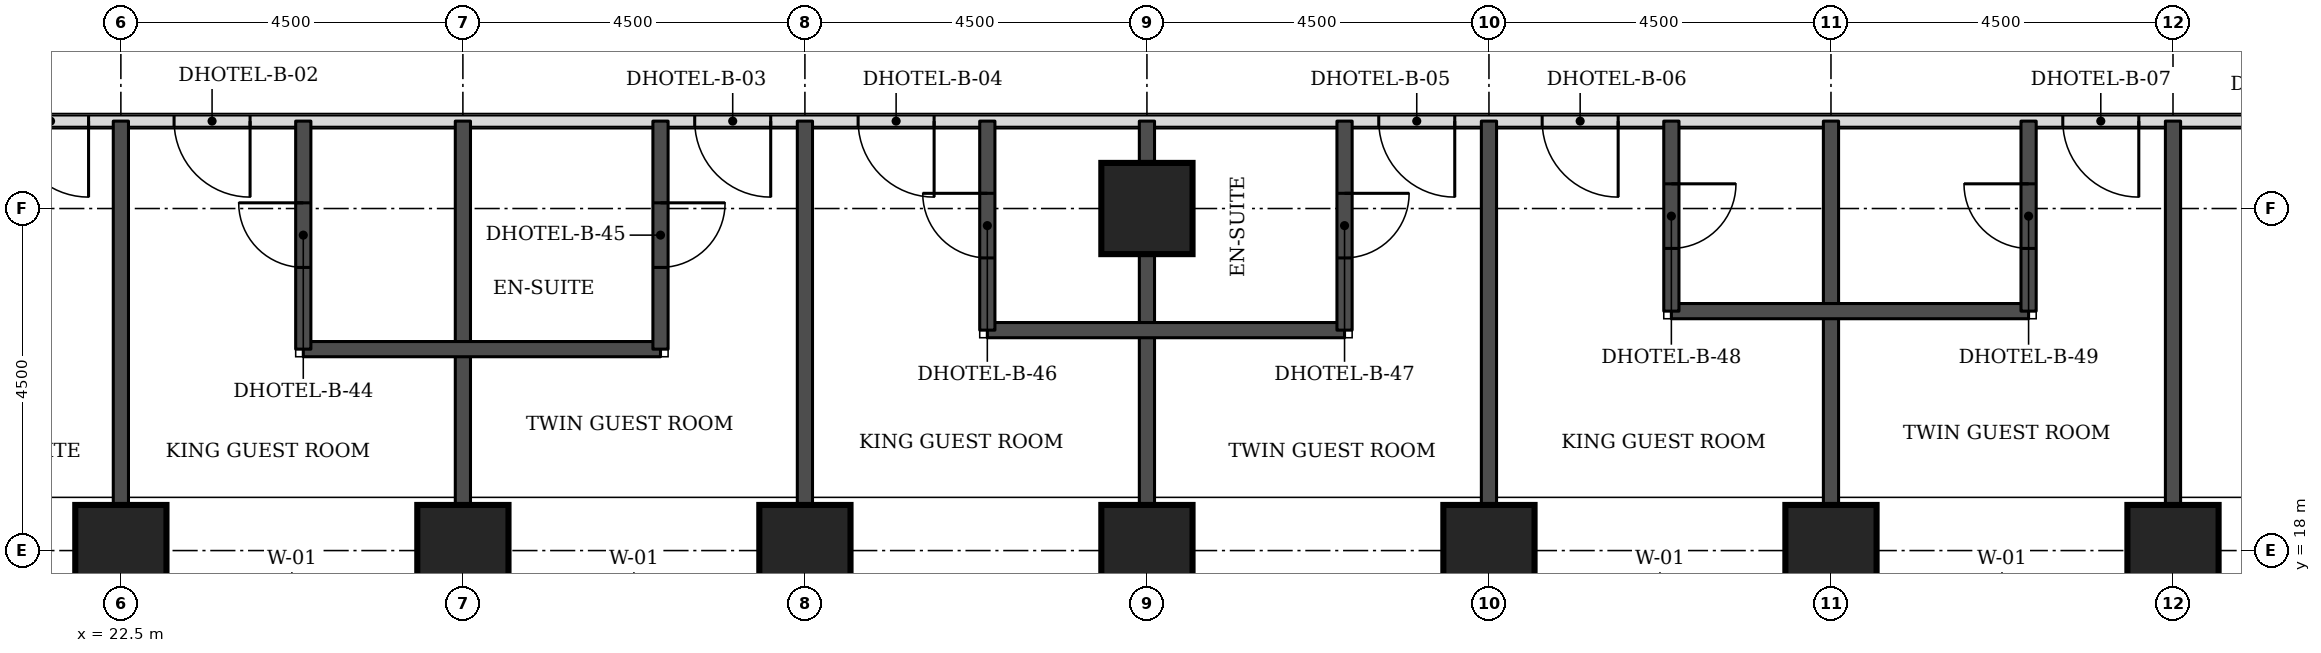
"""IFC4 building model, lengths in metres.
Left out: names, types, materials, properties, quantities, classifications, styles, units other than length and angle.
Written with IfcOpenShell. Run it as: python <this file> out.ifc"""

import sys

from ifc_helpers import new_model, si_unit, direction, frame, frame_2d, origin, origin_2d, place, context, subcontext, project, spatial, rectangle, extrude, element, fill, save


model = new_model("IFC4")
c1 = context("Model", 3, precision=1e-05, world=origin(), true_north=direction((0.0, 1.0)))
c2 = subcontext(c1, "Body", "Model", "MODEL_VIEW")
j1 = project(units=[si_unit("LENGTHUNIT", "METRE"), si_unit("PLANEANGLEUNIT", "RADIAN")], contexts=[c1])
p1 = place(None, origin())
s1 = spatial("IfcSite", under=j1, at=p1, CompositionType="ELEMENT")
p2 = place(p1, origin())
s2 = spatial("IfcBuilding", under=s1, at=p2, CompositionType="ELEMENT")
p3 = place(p2, frame((0.0, 0.0, 52.8)))
s3 = spatial("IfcBuildingStorey", under=s2, at=p3, CompositionType="ELEMENT", Elevation=52.8)
for number, where, z_axis, x_axis in (
    (1, (22.5, 18.0, 0.0), (0.0, 0.0, 1.0), (1.0, 0.0, 0.0)),
    (2, (27.0, 18.0, 0.0), (0.0, 0.0, 1.0), (1.0, 0.0, 0.0)),
    (3, (31.5, 18.0, 0.0), (0.0, 0.0, 1.0), (1.0, 0.0, 0.0)),
    (4, (36.0, 18.0, 0.0), (0.0, 0.0, 1.0), (1.0, 0.0, 0.0)),
    (5, (40.5, 18.0, 0.0), (0.0, 0.0, 1.0), (1.0, 0.0, 0.0)),
    (6, (45.0, 18.0, 0.0), (0.0, 0.0, 1.0), (1.0, 0.0, 0.0)),
    (7, (49.5, 18.0, 0.0), (0.0, 0.0, 1.0), (1.0, 0.0, 0.0)),
    (8, (36.0, 22.5, 0.0), (0.0, 0.0, 1.0), (1.0, 0.0, 0.0)),
):
    element("IfcColumn", number, at=place(p3, frame(where, z_axis=z_axis, x_axis=x_axis)), inside=s3, PredefinedType="COLUMN", context=c2, shape_type="SweptSolid", body=[
        extrude(rectangle(XDim=1.2, YDim=1.2, at=origin_2d()), origin(), (0.0, 0.0, 1.0), 3.3),
    ])
p4 = place(p3, frame((20.65, 23.65, 0.0), z_axis=(0.0, 0.0, 1.0), x_axis=(1.0, 0.0, 0.0)))
e9 = element("IfcWall", 9, at=p4, inside=s3, PredefinedType="PARTITIONING", context=c2, shape_type="SweptSolid", body=[
    extrude(rectangle(XDim=32.2, YDim=0.15, at=frame_2d((16.1, 0.0))), origin(), (0.0, 0.0, 1.0), 3.08),
])
p5 = place(p4, frame((2.55, 0.0, 0.0)))
e10 = element("IfcOpeningElement", 10, at=p5, cuts=e9, PredefinedType="OPENING", context=c2, shape_type="SweptSolid", body=[
    extrude(rectangle(XDim=1.0, YDim=2.1, at=frame_2d((0.5, 1.05))), frame((0.0, 0.085, 0.0), z_axis=(0.0, -1.0, 0.0), x_axis=(1.0, 0.0, 0.0)), (0.0, 0.0, 1.0), 0.17),
])
p6 = place(p4, frame((9.4, 0.0, 0.0)))
e11 = element("IfcOpeningElement", 11, at=p6, cuts=e9, PredefinedType="OPENING", context=c2, shape_type="SweptSolid", body=[
    extrude(rectangle(XDim=1.0, YDim=2.1, at=frame_2d((0.5, 1.05))), frame((0.0, 0.085, 0.0), z_axis=(0.0, -1.0, 0.0), x_axis=(1.0, 0.0, 0.0)), (0.0, 0.0, 1.0), 0.17),
])
p7 = place(p4, frame((11.55, 0.0, 0.0)))
e12 = element("IfcOpeningElement", 12, at=p7, cuts=e9, PredefinedType="OPENING", context=c2, shape_type="SweptSolid", body=[
    extrude(rectangle(XDim=1.0, YDim=2.1, at=frame_2d((0.5, 1.05))), frame((0.0, 0.085, 0.0), z_axis=(0.0, -1.0, 0.0), x_axis=(1.0, 0.0, 0.0)), (0.0, 0.0, 1.0), 0.17),
])
p8 = place(p4, frame((18.4, 0.0, 0.0)))
e13 = element("IfcOpeningElement", 13, at=p8, cuts=e9, PredefinedType="OPENING", context=c2, shape_type="SweptSolid", body=[
    extrude(rectangle(XDim=1.0, YDim=2.1, at=frame_2d((0.5, 1.05))), frame((0.0, 0.085, 0.0), z_axis=(0.0, -1.0, 0.0), x_axis=(1.0, 0.0, 0.0)), (0.0, 0.0, 1.0), 0.17),
])
p9 = place(p4, frame((20.55, 0.0, 0.0)))
e14 = element("IfcOpeningElement", 14, at=p9, cuts=e9, PredefinedType="OPENING", context=c2, shape_type="SweptSolid", body=[
    extrude(rectangle(XDim=1.0, YDim=2.1, at=frame_2d((0.5, 1.05))), frame((0.0, 0.085, 0.0), z_axis=(0.0, -1.0, 0.0), x_axis=(1.0, 0.0, 0.0)), (0.0, 0.0, 1.0), 0.17),
])
p10 = place(p4, frame((27.4, 0.0, 0.0)))
e15 = element("IfcOpeningElement", 15, at=p10, cuts=e9, PredefinedType="OPENING", context=c2, shape_type="SweptSolid", body=[
    extrude(rectangle(XDim=1.0, YDim=2.1, at=frame_2d((0.5, 1.05))), frame((0.0, 0.085, 0.0), z_axis=(0.0, -1.0, 0.0), x_axis=(1.0, 0.0, 0.0)), (0.0, 0.0, 1.0), 0.17),
])
p11 = place(p4, frame((0.425, 0.0, 0.0)))
e16 = element("IfcOpeningElement", 16, at=p11, cuts=e9, PredefinedType="OPENING", context=c2, shape_type="SweptSolid", body=[
    extrude(rectangle(XDim=1.0, YDim=2.1, at=frame_2d((0.5, 1.05))), frame((0.0, 0.085, 0.0), z_axis=(0.0, -1.0, 0.0), x_axis=(1.0, 0.0, 0.0)), (0.0, 0.0, 1.0), 0.17),
])
p12 = place(p4, frame((30.025, 0.0, 0.0)))
e17 = element("IfcOpeningElement", 17, at=p12, cuts=e9, PredefinedType="OPENING", context=c2, shape_type="SweptSolid", body=[
    extrude(rectangle(XDim=1.0, YDim=2.1, at=frame_2d((0.5, 1.05))), frame((0.0, 0.085, 0.0), z_axis=(0.0, -1.0, 0.0), x_axis=(1.0, 0.0, 0.0)), (0.0, 0.0, 1.0), 0.17),
])
for number, where, z_axis, x_axis in (
    (18, (22.5, 18.6, 0.0), (0.0, 0.0, 1.0), (0.0, 1.0, 0.0)),
    (19, (27.0, 18.6, 0.0), (0.0, 0.0, 1.0), (0.0, 1.0, 0.0)),
    (20, (31.5, 18.6, 0.0), (0.0, 0.0, 1.0), (0.0, 1.0, 0.0)),
    (21, (36.0, 18.6, 0.0), (0.0, 0.0, 1.0), (0.0, 1.0, 0.0)),
    (22, (40.5, 18.6, 0.0), (0.0, 0.0, 1.0), (0.0, 1.0, 0.0)),
    (23, (45.0, 18.6, 0.0), (0.0, 0.0, 1.0), (0.0, 1.0, 0.0)),
    (24, (49.5, 18.6, 0.0), (0.0, 0.0, 1.0), (0.0, 1.0, 0.0)),
):
    element("IfcWall", number, at=place(p3, frame(where, z_axis=z_axis, x_axis=x_axis)), inside=s3, PredefinedType="SOLIDWALL", context=c2, shape_type="SweptSolid", body=[
        extrude(rectangle(XDim=5.05, YDim=0.2, at=frame_2d((2.525, 0.0))), origin(), (0.0, 0.0, 1.0), 3.08),
    ])
p13 = place(p3, frame((24.9, 20.65, 0.0), z_axis=(0.0, 0.0, 1.0), x_axis=(1.0, 0.0, 0.0)))
e25 = element("IfcWall", 25, at=p13, inside=s3, PredefinedType="SOLIDWALL", context=c2, shape_type="SweptSolid", body=[
    extrude(rectangle(XDim=4.7, YDim=0.2, at=frame_2d((2.35, 0.0))), origin(), (0.0, 0.0, 1.0), 3.08),
])
p14 = place(p3, frame((24.9, 20.65, 0.0), z_axis=(0.0, 0.0, 1.0), x_axis=(0.0, 1.0, 0.0)))
e26 = element("IfcWall", 26, at=p14, inside=s3, PredefinedType="SOLIDWALL", context=c2, shape_type="SweptSolid", body=[
    extrude(rectangle(XDim=3.0, YDim=0.2, at=frame_2d((1.5, 0.0))), origin(), (0.0, 0.0, 1.0), 3.08),
])
p15 = place(p14, frame((1.075, 0.0, 0.0)))
e27 = element("IfcOpeningElement", 27, at=p15, cuts=e26, PredefinedType="OPENING", context=c2, shape_type="SweptSolid", body=[
    extrude(rectangle(XDim=0.85, YDim=2.1, at=frame_2d((0.425, 1.05))), frame((0.0, 0.11, 0.0), z_axis=(0.0, -1.0, 0.0), x_axis=(1.0, 0.0, 0.0)), (0.0, 0.0, 1.0), 0.22),
])
p16 = place(p3, frame((29.6, 20.65, 0.0), z_axis=(0.0, 0.0, 1.0), x_axis=(0.0, 1.0, 0.0)))
e28 = element("IfcWall", 28, at=p16, inside=s3, PredefinedType="SOLIDWALL", context=c2, shape_type="SweptSolid", body=[
    extrude(rectangle(XDim=3.0, YDim=0.2, at=frame_2d((1.5, 0.0))), origin(), (0.0, 0.0, 1.0), 3.08),
])
p17 = place(p16, frame((1.075, 0.0, 0.0)))
e29 = element("IfcOpeningElement", 29, at=p17, cuts=e28, PredefinedType="OPENING", context=c2, shape_type="SweptSolid", body=[
    extrude(rectangle(XDim=0.85, YDim=2.1, at=frame_2d((0.425, 1.05))), frame((0.0, 0.11, 0.0), z_axis=(0.0, -1.0, 0.0), x_axis=(1.0, 0.0, 0.0)), (0.0, 0.0, 1.0), 0.22),
])
p18 = place(p3, frame((33.9, 20.9, 0.0), z_axis=(0.0, 0.0, 1.0), x_axis=(1.0, 0.0, 0.0)))
e30 = element("IfcWall", 30, at=p18, inside=s3, PredefinedType="SOLIDWALL", context=c2, shape_type="SweptSolid", body=[
    extrude(rectangle(XDim=4.7, YDim=0.2, at=frame_2d((2.35, 0.0))), origin(), (0.0, 0.0, 1.0), 3.08),
])
p19 = place(p3, frame((33.9, 20.9, 0.0), z_axis=(0.0, 0.0, 1.0), x_axis=(0.0, 1.0, 0.0)))
e31 = element("IfcWall", 31, at=p19, inside=s3, PredefinedType="SOLIDWALL", context=c2, shape_type="SweptSolid", body=[
    extrude(rectangle(XDim=2.75, YDim=0.2, at=frame_2d((1.375, 0.0))), origin(), (0.0, 0.0, 1.0), 3.08),
])
p20 = place(p19, frame((0.95, 0.0, 0.0)))
e32 = element("IfcOpeningElement", 32, at=p20, cuts=e31, PredefinedType="OPENING", context=c2, shape_type="SweptSolid", body=[
    extrude(rectangle(XDim=0.85, YDim=2.1, at=frame_2d((0.425, 1.05))), frame((0.0, 0.11, 0.0), z_axis=(0.0, -1.0, 0.0), x_axis=(1.0, 0.0, 0.0)), (0.0, 0.0, 1.0), 0.22),
])
p21 = place(p3, frame((38.6, 20.9, 0.0), z_axis=(0.0, 0.0, 1.0), x_axis=(0.0, 1.0, 0.0)))
e33 = element("IfcWall", 33, at=p21, inside=s3, PredefinedType="SOLIDWALL", context=c2, shape_type="SweptSolid", body=[
    extrude(rectangle(XDim=2.75, YDim=0.2, at=frame_2d((1.375, 0.0))), origin(), (0.0, 0.0, 1.0), 3.08),
])
p22 = place(p21, frame((0.95, 0.0, 0.0)))
e34 = element("IfcOpeningElement", 34, at=p22, cuts=e33, PredefinedType="OPENING", context=c2, shape_type="SweptSolid", body=[
    extrude(rectangle(XDim=0.85, YDim=2.1, at=frame_2d((0.425, 1.05))), frame((0.0, 0.11, 0.0), z_axis=(0.0, -1.0, 0.0), x_axis=(1.0, 0.0, 0.0)), (0.0, 0.0, 1.0), 0.22),
])
p23 = place(p3, frame((42.9, 21.15, 0.0), z_axis=(0.0, 0.0, 1.0), x_axis=(1.0, 0.0, 0.0)))
e35 = element("IfcWall", 35, at=p23, inside=s3, PredefinedType="SOLIDWALL", context=c2, shape_type="SweptSolid", body=[
    extrude(rectangle(XDim=4.7, YDim=0.2, at=frame_2d((2.35, 0.0))), origin(), (0.0, 0.0, 1.0), 3.08),
])
p24 = place(p3, frame((42.9, 21.15, 0.0), z_axis=(0.0, 0.0, 1.0), x_axis=(0.0, 1.0, 0.0)))
e36 = element("IfcWall", 36, at=p24, inside=s3, PredefinedType="SOLIDWALL", context=c2, shape_type="SweptSolid", body=[
    extrude(rectangle(XDim=2.5, YDim=0.2, at=frame_2d((1.25, 0.0))), origin(), (0.0, 0.0, 1.0), 3.08),
])
p25 = place(p24, frame((0.825, 0.0, 0.0)))
e37 = element("IfcOpeningElement", 37, at=p25, cuts=e36, PredefinedType="OPENING", context=c2, shape_type="SweptSolid", body=[
    extrude(rectangle(XDim=0.85, YDim=2.1, at=frame_2d((0.425, 1.05))), frame((0.0, 0.11, 0.0), z_axis=(0.0, -1.0, 0.0), x_axis=(1.0, 0.0, 0.0)), (0.0, 0.0, 1.0), 0.22),
])
p26 = place(p3, frame((47.6, 21.15, 0.0), z_axis=(0.0, 0.0, 1.0), x_axis=(0.0, 1.0, 0.0)))
e38 = element("IfcWall", 38, at=p26, inside=s3, PredefinedType="SOLIDWALL", context=c2, shape_type="SweptSolid", body=[
    extrude(rectangle(XDim=2.5, YDim=0.2, at=frame_2d((1.25, 0.0))), origin(), (0.0, 0.0, 1.0), 3.08),
])
p27 = place(p26, frame((0.825, 0.0, 0.0)))
e39 = element("IfcOpeningElement", 39, at=p27, cuts=e38, PredefinedType="OPENING", context=c2, shape_type="SweptSolid", body=[
    extrude(rectangle(XDim=0.85, YDim=2.1, at=frame_2d((0.425, 1.05))), frame((0.0, 0.11, 0.0), z_axis=(0.0, -1.0, 0.0), x_axis=(1.0, 0.0, 0.0)), (0.0, 0.0, 1.0), 0.22),
])
p28 = place(p5, frame((1.0, 0.0, 0.0), z_axis=(0.0, 0.0, 1.0), x_axis=(-1.0, 0.0, 0.0)))
e40 = element("IfcDoor", 40, at=p28, inside=s3, OperationType="SINGLE_SWING_LEFT", PredefinedType="DOOR", context=c2, shape_type="SweptSolid", body=[
    extrude(rectangle(XDim=1.0, YDim=2.1, at=frame_2d((0.5, 1.05))), frame((0.0, 0.025, 0.0), z_axis=(0.0, -1.0, 0.0), x_axis=(1.0, 0.0, 0.0)), (0.0, 0.0, 1.0), 0.05),
])
fill(e10, e40)
p29 = place(p15, origin())
e41 = element("IfcDoor", 41, at=p29, inside=s3, OperationType="SINGLE_SWING_RIGHT", PredefinedType="DOOR", context=c2, shape_type="SweptSolid", body=[
    extrude(rectangle(XDim=0.85, YDim=2.1, at=frame_2d((0.425, 1.05))), frame((0.0, 0.025, 0.0), z_axis=(0.0, -1.0, 0.0), x_axis=(1.0, 0.0, 0.0)), (0.0, 0.0, 1.0), 0.05),
])
fill(e27, e41)
p30 = place(p6, frame((1.0, 0.0, 0.0), z_axis=(0.0, 0.0, 1.0), x_axis=(-1.0, 0.0, 0.0)))
e42 = element("IfcDoor", 42, at=p30, inside=s3, OperationType="SINGLE_SWING_LEFT", PredefinedType="DOOR", context=c2, shape_type="SweptSolid", body=[
    extrude(rectangle(XDim=1.0, YDim=2.1, at=frame_2d((0.5, 1.05))), frame((0.0, 0.025, 0.0), z_axis=(0.0, -1.0, 0.0), x_axis=(1.0, 0.0, 0.0)), (0.0, 0.0, 1.0), 0.05),
])
fill(e11, e42)
p31 = place(p17, frame((0.85, 0.0, 0.0), z_axis=(0.0, 0.0, 1.0), x_axis=(-1.0, 0.0, 0.0)))
e43 = element("IfcDoor", 43, at=p31, inside=s3, OperationType="SINGLE_SWING_LEFT", PredefinedType="DOOR", context=c2, shape_type="SweptSolid", body=[
    extrude(rectangle(XDim=0.85, YDim=2.1, at=frame_2d((0.425, 1.05))), frame((0.0, 0.025, 0.0), z_axis=(0.0, -1.0, 0.0), x_axis=(1.0, 0.0, 0.0)), (0.0, 0.0, 1.0), 0.05),
])
fill(e29, e43)
p32 = place(p7, frame((1.0, 0.0, 0.0), z_axis=(0.0, 0.0, 1.0), x_axis=(-1.0, 0.0, 0.0)))
e44 = element("IfcDoor", 44, at=p32, inside=s3, OperationType="SINGLE_SWING_LEFT", PredefinedType="DOOR", context=c2, shape_type="SweptSolid", body=[
    extrude(rectangle(XDim=1.0, YDim=2.1, at=frame_2d((0.5, 1.05))), frame((0.0, 0.025, 0.0), z_axis=(0.0, -1.0, 0.0), x_axis=(1.0, 0.0, 0.0)), (0.0, 0.0, 1.0), 0.05),
])
fill(e12, e44)
p33 = place(p20, origin())
e45 = element("IfcDoor", 45, at=p33, inside=s3, OperationType="SINGLE_SWING_RIGHT", PredefinedType="DOOR", context=c2, shape_type="SweptSolid", body=[
    extrude(rectangle(XDim=0.85, YDim=2.1, at=frame_2d((0.425, 1.05))), frame((0.0, 0.025, 0.0), z_axis=(0.0, -1.0, 0.0), x_axis=(1.0, 0.0, 0.0)), (0.0, 0.0, 1.0), 0.05),
])
fill(e32, e45)
p34 = place(p8, frame((1.0, 0.0, 0.0), z_axis=(0.0, 0.0, 1.0), x_axis=(-1.0, 0.0, 0.0)))
e46 = element("IfcDoor", 46, at=p34, inside=s3, OperationType="SINGLE_SWING_LEFT", PredefinedType="DOOR", context=c2, shape_type="SweptSolid", body=[
    extrude(rectangle(XDim=1.0, YDim=2.1, at=frame_2d((0.5, 1.05))), frame((0.0, 0.025, 0.0), z_axis=(0.0, -1.0, 0.0), x_axis=(1.0, 0.0, 0.0)), (0.0, 0.0, 1.0), 0.05),
])
fill(e13, e46)
p35 = place(p22, frame((0.85, 0.0, 0.0), z_axis=(0.0, 0.0, 1.0), x_axis=(-1.0, 0.0, 0.0)))
e47 = element("IfcDoor", 47, at=p35, inside=s3, OperationType="SINGLE_SWING_LEFT", PredefinedType="DOOR", context=c2, shape_type="SweptSolid", body=[
    extrude(rectangle(XDim=0.85, YDim=2.1, at=frame_2d((0.425, 1.05))), frame((0.0, 0.025, 0.0), z_axis=(0.0, -1.0, 0.0), x_axis=(1.0, 0.0, 0.0)), (0.0, 0.0, 1.0), 0.05),
])
fill(e34, e47)
p36 = place(p9, frame((1.0, 0.0, 0.0), z_axis=(0.0, 0.0, 1.0), x_axis=(-1.0, 0.0, 0.0)))
e48 = element("IfcDoor", 48, at=p36, inside=s3, OperationType="SINGLE_SWING_LEFT", PredefinedType="DOOR", context=c2, shape_type="SweptSolid", body=[
    extrude(rectangle(XDim=1.0, YDim=2.1, at=frame_2d((0.5, 1.05))), frame((0.0, 0.025, 0.0), z_axis=(0.0, -1.0, 0.0), x_axis=(1.0, 0.0, 0.0)), (0.0, 0.0, 1.0), 0.05),
])
fill(e14, e48)
p37 = place(p25, frame((0.85, 0.0, 0.0), z_axis=(0.0, 0.0, 1.0), x_axis=(-1.0, 0.0, 0.0)))
e49 = element("IfcDoor", 49, at=p37, inside=s3, OperationType="SINGLE_SWING_LEFT", PredefinedType="DOOR", context=c2, shape_type="SweptSolid", body=[
    extrude(rectangle(XDim=0.85, YDim=2.1, at=frame_2d((0.425, 1.05))), frame((0.0, 0.025, 0.0), z_axis=(0.0, -1.0, 0.0), x_axis=(1.0, 0.0, 0.0)), (0.0, 0.0, 1.0), 0.05),
])
fill(e37, e49)
p38 = place(p10, frame((1.0, 0.0, 0.0), z_axis=(0.0, 0.0, 1.0), x_axis=(-1.0, 0.0, 0.0)))
e50 = element("IfcDoor", 50, at=p38, inside=s3, OperationType="SINGLE_SWING_LEFT", PredefinedType="DOOR", context=c2, shape_type="SweptSolid", body=[
    extrude(rectangle(XDim=1.0, YDim=2.1, at=frame_2d((0.5, 1.05))), frame((0.0, 0.025, 0.0), z_axis=(0.0, -1.0, 0.0), x_axis=(1.0, 0.0, 0.0)), (0.0, 0.0, 1.0), 0.05),
])
fill(e15, e50)
p39 = place(p27, origin())
e51 = element("IfcDoor", 51, at=p39, inside=s3, OperationType="SINGLE_SWING_RIGHT", PredefinedType="DOOR", context=c2, shape_type="SweptSolid", body=[
    extrude(rectangle(XDim=0.85, YDim=2.1, at=frame_2d((0.425, 1.05))), frame((0.0, 0.025, 0.0), z_axis=(0.0, -1.0, 0.0), x_axis=(1.0, 0.0, 0.0)), (0.0, 0.0, 1.0), 0.05),
])
fill(e39, e51)
p40 = place(p11, frame((1.0, 0.0, 0.0), z_axis=(0.0, 0.0, 1.0), x_axis=(-1.0, 0.0, 0.0)))
e52 = element("IfcDoor", 52, at=p40, inside=s3, OperationType="SINGLE_SWING_LEFT", PredefinedType="DOOR", context=c2, shape_type="SweptSolid", body=[
    extrude(rectangle(XDim=1.0, YDim=2.1, at=frame_2d((0.5, 1.05))), frame((0.0, 0.025, 0.0), z_axis=(0.0, -1.0, 0.0), x_axis=(1.0, 0.0, 0.0)), (0.0, 0.0, 1.0), 0.05),
])
fill(e16, e52)
save(model, sys.argv[1])
